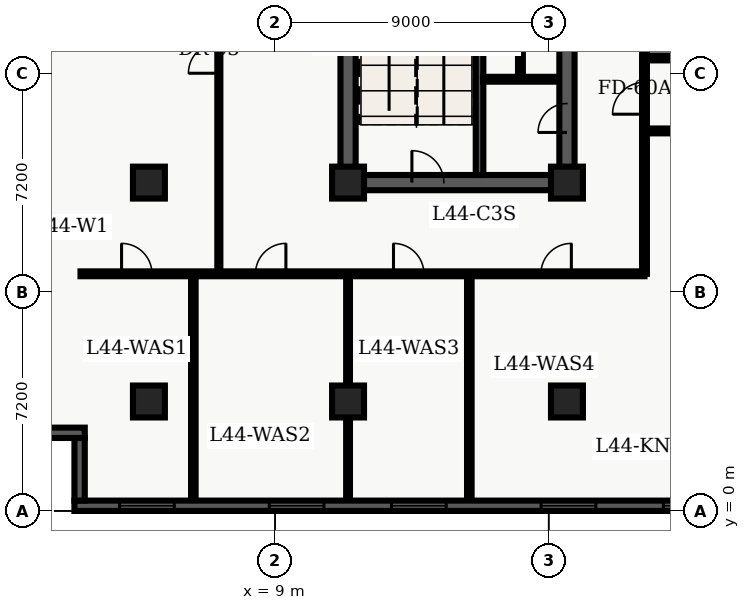
"""IFC4 building model, lengths in metres.
Left out: names, types, materials, properties, quantities, classifications, styles, units other than length and angle.
Written with IfcOpenShell. Run it as: python <this file> out.ifc"""

import sys

from ifc_helpers import new_model, entity, si_unit, converted_unit, direction, frame, origin_with_axes, origin_2d_with_axis, place, context, subcontext, project, spatial, polyline, rectangle, outline, extrude, element, fill, save


model = new_model("IFC4")
c1 = context("Model", 3, precision=1e-05, world=origin_with_axes(), true_north=direction((0.0, 1.0)))
c2 = subcontext(c1, "Body", "Model", "MODEL_VIEW")
j1 = project(units=[si_unit("LENGTHUNIT", "METRE"), converted_unit("PLANEANGLEUNIT", "DEGREE", entity("IfcPlaneAngleMeasure", 0.017), si_unit("PLANEANGLEUNIT", "RADIAN"), dimensions=[0, 0, 0, 0, 0, 0, 0])], contexts=[c1])
p1 = place(None, origin_with_axes())
s1 = spatial("IfcSite", under=j1, at=p1, CompositionType="ELEMENT")
p2 = place(p1, origin_with_axes())
s2 = spatial("IfcBuilding", under=s1, at=p2, CompositionType="ELEMENT")
p3 = place(p2, frame((0.0, 0.0, 179.7), z_axis=(0.0, 0.0, 1.0), x_axis=(1.0, 0.0, 0.0)))
s3 = spatial("IfcBuildingStorey", under=s2, at=p3, CompositionType="ELEMENT", Elevation=179.7)
p4 = place(p3, frame((11.4, 10.8, 0.0), z_axis=(0.0, 0.0, 1.0), x_axis=(0.0, 1.0, 0.0)))
e1 = element("IfcWall", 1, at=p4, inside=s3, PredefinedType="SHEAR", context=c2, shape_type="SweptSolid", body=[
    extrude(outline(polyline([(0.0, -0.25), (27.0, -0.25), (27.0, 0.25), (0.0, 0.25), (0.0, -0.25)])), origin_with_axes(), (0.0, 0.0, 1.0), 3.66),
])
p5 = place(p3, frame((11.4, 10.8, 0.0), z_axis=(0.0, 0.0, 1.0), x_axis=(1.0, 0.0, 0.0)))
e2 = element("IfcWall", 2, at=p5, inside=s3, PredefinedType="SHEAR", context=c2, shape_type="SweptSolid", body=[
    extrude(outline(polyline([(0.0, -0.25), (7.2, -0.25), (7.2, 0.25), (0.0, 0.25), (0.0, -0.25)])), origin_with_axes(), (0.0, 0.0, 1.0), 3.66),
])
p6 = place(p5, frame((2.625, 0.0, 0.0), z_axis=(0.0, 0.0, 1.0), x_axis=(1.0, 0.0, 0.0)))
e3 = element("IfcOpeningElement", 3, at=p6, cuts=e2, PredefinedType="OPENING", context=c2, shape_type="SweptSolid", body=[
    extrude(rectangle(XDim=1.05, YDim=0.52, at=origin_2d_with_axis()), origin_with_axes(), (0.0, 0.0, 1.0), 2.15),
])
p7 = place(p3, frame((18.6, 10.8, 0.0), z_axis=(0.0, 0.0, 1.0), x_axis=(0.0, 1.0, 0.0)))
e4 = element("IfcWall", 4, at=p7, inside=s3, PredefinedType="SHEAR", context=c2, shape_type="SweptSolid", body=[
    extrude(outline(polyline([(0.0, -0.25), (13.5, -0.25), (13.5, 0.25), (0.0, 0.25), (0.0, -0.25)])), origin_with_axes(), (0.0, 0.0, 1.0), 3.66),
])
p8 = place(p7, frame((11.125, 0.0, 0.0), z_axis=(0.0, 0.0, 1.0), x_axis=(1.0, 0.0, 0.0)))
e5 = element("IfcOpeningElement", 5, at=p8, cuts=e4, PredefinedType="OPENING", context=c2, shape_type="SweptSolid", body=[
    extrude(rectangle(XDim=1.05, YDim=0.52, at=origin_2d_with_axis()), origin_with_axes(), (0.0, 0.0, 1.0), 2.15),
])
p9 = place(p7, frame((2.125, 0.0, 0.0), z_axis=(0.0, 0.0, 1.0), x_axis=(1.0, 0.0, 0.0)))
e6 = element("IfcOpeningElement", 6, at=p9, cuts=e4, PredefinedType="OPENING", context=c2, shape_type="SweptSolid", body=[
    extrude(rectangle(XDim=0.95, YDim=0.52, at=origin_2d_with_axis()), origin_with_axes(), (0.0, 0.0, 1.0), 2.15),
])
p10 = place(p7, frame((6.275, 0.0, 0.0), z_axis=(0.0, 0.0, 1.0), x_axis=(1.0, 0.0, 0.0)))
e7 = element("IfcOpeningElement", 7, at=p10, cuts=e4, PredefinedType="OPENING", context=c2, shape_type="SweptSolid", body=[
    extrude(rectangle(XDim=0.95, YDim=0.52, at=origin_2d_with_axis()), origin_with_axes(), (0.0, 0.0, 1.0), 2.15),
])
p11 = place(p3, frame((15.725, 11.05, 0.0), z_axis=(0.0, 0.0, 1.0), x_axis=(0.0, 1.0, 0.0)))
e8 = element("IfcWall", 8, at=p11, inside=s3, PredefinedType="SHEAR", context=c2, shape_type="SweptSolid", body=[
    extrude(outline(polyline([(0.0, -0.125), (8.65, -0.125), (8.65, 0.125), (0.0, 0.125), (0.0, -0.125)])), origin_with_axes(), (0.0, 0.0, 1.0), 3.66),
])
for number, where, z_axis, x_axis in (
    (9, (11.4, 3.6, 0.0), (0.0, 0.0, 1.0), (1.0, 0.0, 0.0)),
    (10, (11.4, 10.8, 0.0), (0.0, 0.0, 1.0), (1.0, 0.0, 0.0)),
    (11, (18.6, 3.6, 0.0), (0.0, 0.0, 1.0), (1.0, 0.0, 0.0)),
    (12, (18.6, 10.8, 0.0), (0.0, 0.0, 1.0), (1.0, 0.0, 0.0)),
    (13, (4.85, 3.6, 0.0), (0.0, 0.0, 1.0), (1.0, 0.0, 0.0)),
    (14, (4.85, 10.8, 0.0), (0.0, 0.0, 1.0), (1.0, 0.0, 0.0)),
):
    element("IfcColumn", number, at=place(p3, frame(where, z_axis=z_axis, x_axis=x_axis)), inside=s3, PredefinedType="COLUMN", context=c2, shape_type="SweptSolid", body=[
        extrude(rectangle(XDim=1.05, YDim=1.05, at=origin_2d_with_axis()), origin_with_axes(), (0.0, 0.0, 1.0), 3.9),
    ])
p12 = place(p3, frame((15.84, 14.2, 0.0), z_axis=(0.0, 0.0, 1.0), x_axis=(1.0, 0.0, 0.0)))
e15 = element("IfcWall", 15, at=p12, inside=s3, PredefinedType="PARTITIONING", context=c2, shape_type="SweptSolid", body=[
    extrude(outline(polyline([(0.0, -0.08), (2.46, -0.08), (2.46, 0.08), (0.0, 0.08), (0.0, -0.08)])), origin_with_axes(), (0.0, 0.0, 1.0), 2.7),
])
p13 = place(p3, frame((17.07, 14.28, 0.0), z_axis=(0.0, 0.0, 1.0), x_axis=(0.0, 1.0, 0.0)))
e16 = element("IfcWall", 16, at=p13, inside=s3, PredefinedType="PARTITIONING", context=c2, shape_type="SweptSolid", body=[
    extrude(outline(polyline([(0.0, -0.08), (5.42, -0.08), (5.42, 0.08), (0.0, 0.08), (0.0, -0.08)])), origin_with_axes(), (0.0, 0.0, 1.0), 2.7),
])
p14 = place(p13, frame((2.6, 0.0, 0.0), z_axis=(0.0, 0.0, 1.0), x_axis=(1.0, 0.0, 0.0)))
e17 = element("IfcOpeningElement", 17, at=p14, cuts=e16, PredefinedType="OPENING", context=c2, shape_type="SweptSolid", body=[
    extrude(rectangle(XDim=0.9, YDim=0.18, at=origin_2d_with_axis()), origin_with_axes(), (0.0, 0.0, 1.0), 2.15),
])
p15 = place(p3, frame((2.6, 7.8, 0.0), z_axis=(0.0, 0.0, 1.0), x_axis=(1.0, 0.0, 0.0)))
e18 = element("IfcWall", 18, at=p15, inside=s3, PredefinedType="PARTITIONING", context=c2, shape_type="SweptSolid", body=[
    extrude(outline(polyline([(0.0, -0.08), (18.55, -0.08), (18.55, 0.08), (0.0, 0.08), (0.0, -0.08)])), origin_with_axes(), (0.0, 0.0, 1.0), 2.7),
])
p16 = place(p15, frame((1.851, 0.0, 0.0), z_axis=(0.0, 0.0, 1.0), x_axis=(1.0, 0.0, 0.0)))
e19 = element("IfcOpeningElement", 19, at=p16, cuts=e18, PredefinedType="OPENING", context=c2, shape_type="SweptSolid", body=[
    extrude(rectangle(XDim=1.0, YDim=0.18, at=origin_2d_with_axis()), origin_with_axes(), (0.0, 0.0, 1.0), 2.15),
])
p17 = place(p15, frame((6.255, 0.0, 0.0), z_axis=(0.0, 0.0, 1.0), x_axis=(1.0, 0.0, 0.0)))
e20 = element("IfcOpeningElement", 20, at=p17, cuts=e18, PredefinedType="OPENING", context=c2, shape_type="SweptSolid", body=[
    extrude(rectangle(XDim=1.0, YDim=0.18, at=origin_2d_with_axis()), origin_with_axes(), (0.0, 0.0, 1.0), 2.15),
])
p18 = place(p15, frame((10.794, 0.0, 0.0), z_axis=(0.0, 0.0, 1.0), x_axis=(1.0, 0.0, 0.0)))
e21 = element("IfcOpeningElement", 21, at=p18, cuts=e18, PredefinedType="OPENING", context=c2, shape_type="SweptSolid", body=[
    extrude(rectangle(XDim=1.0, YDim=0.18, at=origin_2d_with_axis()), origin_with_axes(), (0.0, 0.0, 1.0), 2.15),
])
p19 = place(p15, frame((15.645, 0.0, 0.0), z_axis=(0.0, 0.0, 1.0), x_axis=(1.0, 0.0, 0.0)))
e22 = element("IfcOpeningElement", 22, at=p19, cuts=e18, PredefinedType="OPENING", context=c2, shape_type="SweptSolid", body=[
    extrude(rectangle(XDim=1.0, YDim=0.18, at=origin_2d_with_axis()), origin_with_axes(), (0.0, 0.0, 1.0), 2.15),
])
p20 = place(p3, frame((21.15, 7.8, 0.0), z_axis=(0.0, 0.0, 1.0), x_axis=(0.0, 1.0, 0.0)))
e23 = element("IfcWall", 23, at=p20, inside=s3, PredefinedType="PARTITIONING", context=c2, shape_type="SweptSolid", body=[
    extrude(outline(polyline([(0.0, -0.08), (32.7, -0.08), (32.7, 0.08), (0.0, 0.08), (0.0, -0.08)])), origin_with_axes(), (0.0, 0.0, 1.0), 2.7),
])
p21 = place(p20, frame((16.495, 0.0, 0.0), z_axis=(0.0, 0.0, 1.0), x_axis=(1.0, 0.0, 0.0)))
e24 = element("IfcOpeningElement", 24, at=p21, cuts=e23, PredefinedType="OPENING", context=c2, shape_type="SweptSolid", body=[
    extrude(rectangle(XDim=1.0, YDim=0.18, at=origin_2d_with_axis()), origin_with_axes(), (0.0, 0.0, 1.0), 2.15),
])
p22 = place(p20, frame((22.148, 0.0, 0.0), z_axis=(0.0, 0.0, 1.0), x_axis=(1.0, 0.0, 0.0)))
e25 = element("IfcOpeningElement", 25, at=p22, cuts=e23, PredefinedType="OPENING", context=c2, shape_type="SweptSolid", body=[
    extrude(rectangle(XDim=1.0, YDim=0.18, at=origin_2d_with_axis()), origin_with_axes(), (0.0, 0.0, 1.0), 2.15),
])
p23 = place(p20, frame((28.902, 0.0, 0.0), z_axis=(0.0, 0.0, 1.0), x_axis=(1.0, 0.0, 0.0)))
e26 = element("IfcOpeningElement", 26, at=p23, cuts=e23, PredefinedType="OPENING", context=c2, shape_type="SweptSolid", body=[
    extrude(rectangle(XDim=1.0, YDim=0.18, at=origin_2d_with_axis()), origin_with_axes(), (0.0, 0.0, 1.0), 2.15),
])
p24 = place(p20, frame((5.775, 0.0, 0.0), z_axis=(0.0, 0.0, 1.0), x_axis=(1.0, 0.0, 0.0)))
e27 = element("IfcOpeningElement", 27, at=p24, cuts=e23, PredefinedType="OPENING", context=c2, shape_type="SweptSolid", body=[
    extrude(rectangle(XDim=1.05, YDim=0.18, at=origin_2d_with_axis()), origin_with_axes(), (0.0, 0.0, 1.0), 2.15),
])
p25 = place(p3, frame((7.15, 7.8, 0.0), z_axis=(0.0, 0.0, 1.0), x_axis=(0.0, 1.0, 0.0)))
e28 = element("IfcWall", 28, at=p25, inside=s3, PredefinedType="PARTITIONING", context=c2, shape_type="SweptSolid", body=[
    extrude(outline(polyline([(0.0, -0.05), (32.7, -0.05), (32.7, 0.05), (0.0, 0.05), (0.0, -0.05)])), origin_with_axes(), (0.0, 0.0, 1.0), 2.7),
])
p26 = place(p25, frame((7.098, 0.0, 0.0), z_axis=(0.0, 0.0, 1.0), x_axis=(1.0, 0.0, 0.0)))
e29 = element("IfcOpeningElement", 29, at=p26, cuts=e28, PredefinedType="OPENING", context=c2, shape_type="SweptSolid", body=[
    extrude(rectangle(XDim=1.0, YDim=0.12, at=origin_2d_with_axis()), origin_with_axes(), (0.0, 0.0, 1.0), 2.15),
])
p27 = place(p25, frame((23.317, 0.0, 0.0), z_axis=(0.0, 0.0, 1.0), x_axis=(1.0, 0.0, 0.0)))
e30 = element("IfcOpeningElement", 30, at=p27, cuts=e28, PredefinedType="OPENING", context=c2, shape_type="SweptSolid", body=[
    extrude(rectangle(XDim=1.0, YDim=0.12, at=origin_2d_with_axis()), origin_with_axes(), (0.0, 0.0, 1.0), 2.15),
])
p28 = place(p3, frame((6.311, 0.335, 0.0), z_axis=(0.0, 0.0, 1.0), x_axis=(0.0, 1.0, 0.0)))
e31 = element("IfcWall", 31, at=p28, inside=s3, PredefinedType="PARTITIONING", context=c2, shape_type="SweptSolid", body=[
    extrude(outline(polyline([(0.0, -0.075), (7.365, -0.075), (7.365, 0.075), (0.0, 0.075), (0.0, -0.075)])), origin_with_axes(), (0.0, 0.0, 1.0), 2.7),
])
p29 = place(p3, frame((11.4, 0.335, 0.0), z_axis=(0.0, 0.0, 1.0), x_axis=(0.0, 1.0, 0.0)))
e32 = element("IfcWall", 32, at=p29, inside=s3, PredefinedType="PARTITIONING", context=c2, shape_type="SweptSolid", body=[
    extrude(outline(polyline([(0.0, -0.062), (7.365, -0.062), (7.365, 0.062), (0.0, 0.062), (0.0, -0.062)])), origin_with_axes(), (0.0, 0.0, 1.0), 2.7),
])
p30 = place(p3, frame((15.389, 0.335, 0.0), z_axis=(0.0, 0.0, 1.0), x_axis=(0.0, 1.0, 0.0)))
e33 = element("IfcWall", 33, at=p30, inside=s3, PredefinedType="PARTITIONING", context=c2, shape_type="SweptSolid", body=[
    extrude(outline(polyline([(0.0, -0.075), (7.365, -0.075), (7.365, 0.075), (0.0, 0.075), (0.0, -0.075)])), origin_with_axes(), (0.0, 0.0, 1.0), 2.7),
])
p31 = place(p3, frame((21.15, 12.5, 0.0), z_axis=(0.0, 0.0, 1.0), x_axis=(1.0, 0.0, 0.0)))
e34 = element("IfcWall", 34, at=p31, inside=s3, PredefinedType="PARTITIONING", context=c2, shape_type="SweptSolid", body=[
    extrude(outline(polyline([(0.0, -0.08), (15.2, -0.08), (15.2, 0.08), (0.0, 0.08), (0.0, -0.08)])), origin_with_axes(), (0.0, 0.0, 1.0), 2.7),
])
p32 = place(p31, frame((1.761, 0.0, 0.0), z_axis=(0.0, 0.0, 1.0), x_axis=(1.0, 0.0, 0.0)))
e35 = element("IfcOpeningElement", 35, at=p32, cuts=e34, PredefinedType="OPENING", context=c2, shape_type="SweptSolid", body=[
    extrude(rectangle(XDim=1.0, YDim=0.18, at=origin_2d_with_axis()), origin_with_axes(), (0.0, 0.0, 1.0), 2.15),
])
p33 = place(p31, frame((4.896, 0.0, 0.0), z_axis=(0.0, 0.0, 1.0), x_axis=(1.0, 0.0, 0.0)))
e36 = element("IfcOpeningElement", 36, at=p33, cuts=e34, PredefinedType="OPENING", context=c2, shape_type="SweptSolid", body=[
    extrude(rectangle(XDim=1.0, YDim=0.18, at=origin_2d_with_axis()), origin_with_axes(), (0.0, 0.0, 1.0), 2.15),
])
p34 = place(p31, frame((8.536, 0.0, 0.0), z_axis=(0.0, 0.0, 1.0), x_axis=(1.0, 0.0, 0.0)))
e37 = element("IfcOpeningElement", 37, at=p34, cuts=e34, PredefinedType="OPENING", context=c2, shape_type="SweptSolid", body=[
    extrude(rectangle(XDim=1.0, YDim=0.18, at=origin_2d_with_axis()), origin_with_axes(), (0.0, 0.0, 1.0), 2.15),
])
p35 = place(p31, frame((12.871, 0.0, 0.0), z_axis=(0.0, 0.0, 1.0), x_axis=(1.0, 0.0, 0.0)))
e38 = element("IfcOpeningElement", 38, at=p35, cuts=e34, PredefinedType="OPENING", context=c2, shape_type="SweptSolid", body=[
    extrude(rectangle(XDim=1.0, YDim=0.18, at=origin_2d_with_axis()), origin_with_axes(), (0.0, 0.0, 1.0), 2.15),
])
p36 = place(p3, frame((21.15, 14.9, 0.0), z_axis=(0.0, 0.0, 1.0), x_axis=(1.0, 0.0, 0.0)))
e39 = element("IfcWall", 39, at=p36, inside=s3, PredefinedType="PARTITIONING", context=c2, shape_type="SweptSolid", body=[
    extrude(outline(polyline([(0.0, -0.08), (15.2, -0.08), (15.2, 0.08), (0.0, 0.08), (0.0, -0.08)])), origin_with_axes(), (0.0, 0.0, 1.0), 2.7),
])
p37 = place(p36, frame((7.65, 0.0, 0.0), z_axis=(0.0, 0.0, 1.0), x_axis=(1.0, 0.0, 0.0)))
e40 = element("IfcOpeningElement", 40, at=p37, cuts=e39, PredefinedType="OPENING", context=c2, shape_type="SweptSolid", body=[
    extrude(rectangle(XDim=1.0, YDim=0.18, at=origin_2d_with_axis()), origin_with_axes(), (0.0, 0.0, 1.0), 2.15),
])
p38 = place(p3, frame((57.26, 0.17, 0.0), z_axis=(0.0, 0.0, 1.0), x_axis=(-1.0, 0.0, 0.0)))
e41 = element("IfcWall", 41, at=p38, inside=s3, PredefinedType="SOLIDWALL", context=c2, shape_type="SweptSolid", body=[
    extrude(outline(polyline([(0.0, -0.17), (54.86, -0.17), (54.86, 0.17), (0.0, 0.17), (0.0, -0.17)])), origin_with_axes(), (0.0, 0.0, 1.0), 3.66),
])
p39 = place(p38, frame((2.836, 0.0, 0.45), z_axis=(0.0, 0.0, 1.0), x_axis=(1.0, 0.0, 0.0)))
e42 = element("IfcOpeningElement", 42, at=p39, cuts=e41, PredefinedType="OPENING", context=c2, shape_type="SweptSolid", body=[
    extrude(rectangle(XDim=1.8, YDim=0.36, at=origin_2d_with_axis()), origin_with_axes(), (0.0, 0.0, 1.0), 2.1),
])
p40 = place(p38, frame((7.307, 0.0, 0.45), z_axis=(0.0, 0.0, 1.0), x_axis=(1.0, 0.0, 0.0)))
e43 = element("IfcOpeningElement", 43, at=p40, cuts=e41, PredefinedType="OPENING", context=c2, shape_type="SweptSolid", body=[
    extrude(rectangle(XDim=1.8, YDim=0.36, at=origin_2d_with_axis()), origin_with_axes(), (0.0, 0.0, 1.0), 2.1),
])
p41 = place(p38, frame((11.779, 0.0, 0.45), z_axis=(0.0, 0.0, 1.0), x_axis=(1.0, 0.0, 0.0)))
e44 = element("IfcOpeningElement", 44, at=p41, cuts=e41, PredefinedType="OPENING", context=c2, shape_type="SweptSolid", body=[
    extrude(rectangle(XDim=1.8, YDim=0.36, at=origin_2d_with_axis()), origin_with_axes(), (0.0, 0.0, 1.0), 2.1),
])
p42 = place(p38, frame((16.251, 0.0, 0.45), z_axis=(0.0, 0.0, 1.0), x_axis=(1.0, 0.0, 0.0)))
e45 = element("IfcOpeningElement", 45, at=p42, cuts=e41, PredefinedType="OPENING", context=c2, shape_type="SweptSolid", body=[
    extrude(rectangle(XDim=1.8, YDim=0.36, at=origin_2d_with_axis()), origin_with_axes(), (0.0, 0.0, 1.0), 2.1),
])
p43 = place(p38, frame((20.723, 0.0, 0.45), z_axis=(0.0, 0.0, 1.0), x_axis=(1.0, 0.0, 0.0)))
e46 = element("IfcOpeningElement", 46, at=p43, cuts=e41, PredefinedType="OPENING", context=c2, shape_type="SweptSolid", body=[
    extrude(rectangle(XDim=1.8, YDim=0.36, at=origin_2d_with_axis()), origin_with_axes(), (0.0, 0.0, 1.0), 2.1),
])
p44 = place(p38, frame((34.588, 0.0, 0.45), z_axis=(0.0, 0.0, 1.0), x_axis=(1.0, 0.0, 0.0)))
e47 = element("IfcOpeningElement", 47, at=p44, cuts=e41, PredefinedType="OPENING", context=c2, shape_type="SweptSolid", body=[
    extrude(rectangle(XDim=1.8, YDim=0.36, at=origin_2d_with_axis()), origin_with_axes(), (0.0, 0.0, 1.0), 2.1),
])
p45 = place(p38, frame((38.609, 0.0, 0.45), z_axis=(0.0, 0.0, 1.0), x_axis=(1.0, 0.0, 0.0)))
e48 = element("IfcOpeningElement", 48, at=p45, cuts=e41, PredefinedType="OPENING", context=c2, shape_type="SweptSolid", body=[
    extrude(rectangle(XDim=1.8, YDim=0.36, at=origin_2d_with_axis()), origin_with_axes(), (0.0, 0.0, 1.0), 2.1),
])
p46 = place(p38, frame((43.531, 0.0, 0.45), z_axis=(0.0, 0.0, 1.0), x_axis=(1.0, 0.0, 0.0)))
e49 = element("IfcOpeningElement", 49, at=p46, cuts=e41, PredefinedType="OPENING", context=c2, shape_type="SweptSolid", body=[
    extrude(rectangle(XDim=1.8, YDim=0.36, at=origin_2d_with_axis()), origin_with_axes(), (0.0, 0.0, 1.0), 2.1),
])
p47 = place(p38, frame((47.553, 0.0, 0.45), z_axis=(0.0, 0.0, 1.0), x_axis=(1.0, 0.0, 0.0)))
e50 = element("IfcOpeningElement", 50, at=p47, cuts=e41, PredefinedType="OPENING", context=c2, shape_type="SweptSolid", body=[
    extrude(rectangle(XDim=1.8, YDim=0.36, at=origin_2d_with_axis()), origin_with_axes(), (0.0, 0.0, 1.0), 2.1),
])
p48 = place(p38, frame((52.474, 0.0, 0.45), z_axis=(0.0, 0.0, 1.0), x_axis=(1.0, 0.0, 0.0)))
e51 = element("IfcOpeningElement", 51, at=p48, cuts=e41, PredefinedType="OPENING", context=c2, shape_type="SweptSolid", body=[
    extrude(rectangle(XDim=1.8, YDim=0.36, at=origin_2d_with_axis()), origin_with_axes(), (0.0, 0.0, 1.0), 2.1),
])
p49 = place(p3, frame((2.57, 0.34, 0.0), z_axis=(0.0, 0.0, 1.0), x_axis=(0.0, 1.0, 0.0)))
e52 = element("IfcWall", 52, at=p49, inside=s3, PredefinedType="SOLIDWALL", context=c2, shape_type="SweptSolid", body=[
    extrude(outline(polyline([(0.0, -0.17), (2.06, -0.17), (2.06, 0.17), (0.0, 0.17), (0.0, -0.17)])), origin_with_axes(), (0.0, 0.0, 1.0), 3.66),
])
p50 = place(p3, frame((2.74, 2.57, 0.0), z_axis=(0.0, 0.0, 1.0), x_axis=(-1.0, 0.0, 0.0)))
e53 = element("IfcWall", 53, at=p50, inside=s3, PredefinedType="SOLIDWALL", context=c2, shape_type="SweptSolid", body=[
    extrude(outline(polyline([(0.0, -0.17), (2.74, -0.17), (2.74, 0.17), (0.0, 0.17), (0.0, -0.17)])), origin_with_axes(), (0.0, 0.0, 1.0), 3.66),
])
p51 = place(p5, frame((2.625, 0.0, 0.0), z_axis=(0.0, 0.0, 1.0), x_axis=(1.0, 0.0, 0.0)))
e54 = element("IfcDoor", 54, at=p51, inside=s3, OperationType="SINGLE_SWING_LEFT", PredefinedType="DOOR", context=c2, shape_type="SweptSolid", body=[
    extrude(rectangle(XDim=1.05, YDim=0.09, at=origin_2d_with_axis()), origin_with_axes(), (0.0, 0.0, 1.0), 2.15),
])
fill(e3, e54)
p52 = place(p7, frame((2.125, 0.0, 0.0), z_axis=(0.0, 0.0, 1.0), x_axis=(1.0, 0.0, 0.0)))
e55 = element("IfcDoor", 55, at=p52, inside=s3, OperationType="SINGLE_SWING_LEFT", PredefinedType="DOOR", context=c2, shape_type="SweptSolid", body=[
    extrude(rectangle(XDim=0.95, YDim=0.09, at=origin_2d_with_axis()), origin_with_axes(), (0.0, 0.0, 1.0), 2.15),
])
fill(e6, e55)
p53 = place(p25, frame((7.098, 0.0, 0.0), z_axis=(0.0, 0.0, 1.0), x_axis=(1.0, 0.0, 0.0)))
e56 = element("IfcDoor", 56, at=p53, inside=s3, OperationType="SINGLE_SWING_LEFT", PredefinedType="DOOR", context=c2, shape_type="SweptSolid", body=[
    extrude(rectangle(XDim=1.0, YDim=0.06, at=origin_2d_with_axis()), origin_with_axes(), (0.0, 0.0, 1.0), 2.15),
])
fill(e29, e56)
p54 = place(p15, frame((1.851, 0.0, 0.0), z_axis=(0.0, 0.0, 1.0), x_axis=(1.0, 0.0, 0.0)))
e57 = element("IfcDoor", 57, at=p54, inside=s3, OperationType="SINGLE_SWING_LEFT", PredefinedType="DOOR", context=c2, shape_type="SweptSolid", body=[
    extrude(rectangle(XDim=1.0, YDim=0.09, at=origin_2d_with_axis()), origin_with_axes(), (0.0, 0.0, 1.0), 2.15),
])
fill(e19, e57)
p55 = place(p15, frame((6.255, 0.0, 0.0), z_axis=(0.0, 0.0, 1.0), x_axis=(1.0, 0.0, 0.0)))
e58 = element("IfcDoor", 58, at=p55, inside=s3, OperationType="SINGLE_SWING_RIGHT", PredefinedType="DOOR", context=c2, shape_type="SweptSolid", body=[
    extrude(rectangle(XDim=1.0, YDim=0.09, at=origin_2d_with_axis()), origin_with_axes(), (0.0, 0.0, 1.0), 2.15),
])
fill(e20, e58)
p56 = place(p15, frame((10.794, 0.0, 0.0), z_axis=(0.0, 0.0, 1.0), x_axis=(1.0, 0.0, 0.0)))
e59 = element("IfcDoor", 59, at=p56, inside=s3, OperationType="SINGLE_SWING_LEFT", PredefinedType="DOOR", context=c2, shape_type="SweptSolid", body=[
    extrude(rectangle(XDim=1.0, YDim=0.09, at=origin_2d_with_axis()), origin_with_axes(), (0.0, 0.0, 1.0), 2.15),
])
fill(e21, e59)
p57 = place(p15, frame((15.645, 0.0, 0.0), z_axis=(0.0, 0.0, 1.0), x_axis=(1.0, 0.0, 0.0)))
e60 = element("IfcDoor", 60, at=p57, inside=s3, OperationType="SINGLE_SWING_RIGHT", PredefinedType="DOOR", context=c2, shape_type="SweptSolid", body=[
    extrude(rectangle(XDim=1.0, YDim=0.09, at=origin_2d_with_axis()), origin_with_axes(), (0.0, 0.0, 1.0), 2.15),
])
fill(e22, e60)
p58 = place(p20, frame((5.775, 0.0, 0.0), z_axis=(0.0, 0.0, 1.0), x_axis=(1.0, 0.0, 0.0)))
e61 = element("IfcDoor", 61, at=p58, inside=s3, OperationType="SINGLE_SWING_LEFT", PredefinedType="DOOR", context=c2, shape_type="SweptSolid", body=[
    extrude(rectangle(XDim=1.05, YDim=0.09, at=origin_2d_with_axis()), origin_with_axes(), (0.0, 0.0, 1.0), 2.15),
])
fill(e27, e61)
p59 = place(p38, frame((34.588, 0.0, 0.45), z_axis=(0.0, 0.0, 1.0), x_axis=(1.0, 0.0, 0.0)))
e62 = element("IfcWindow", 62, at=p59, inside=s3, PredefinedType="WINDOW", context=c2, shape_type="SweptSolid", body=[
    extrude(rectangle(XDim=1.8, YDim=0.09, at=origin_2d_with_axis()), origin_with_axes(), (0.0, 0.0, 1.0), 2.1),
])
fill(e47, e62)
p60 = place(p38, frame((38.609, 0.0, 0.45), z_axis=(0.0, 0.0, 1.0), x_axis=(1.0, 0.0, 0.0)))
e63 = element("IfcWindow", 63, at=p60, inside=s3, PredefinedType="WINDOW", context=c2, shape_type="SweptSolid", body=[
    extrude(rectangle(XDim=1.8, YDim=0.09, at=origin_2d_with_axis()), origin_with_axes(), (0.0, 0.0, 1.0), 2.1),
])
fill(e48, e63)
p61 = place(p38, frame((43.531, 0.0, 0.45), z_axis=(0.0, 0.0, 1.0), x_axis=(1.0, 0.0, 0.0)))
e64 = element("IfcWindow", 64, at=p61, inside=s3, PredefinedType="WINDOW", context=c2, shape_type="SweptSolid", body=[
    extrude(rectangle(XDim=1.8, YDim=0.09, at=origin_2d_with_axis()), origin_with_axes(), (0.0, 0.0, 1.0), 2.1),
])
fill(e49, e64)
p62 = place(p38, frame((47.553, 0.0, 0.45), z_axis=(0.0, 0.0, 1.0), x_axis=(1.0, 0.0, 0.0)))
e65 = element("IfcWindow", 65, at=p62, inside=s3, PredefinedType="WINDOW", context=c2, shape_type="SweptSolid", body=[
    extrude(rectangle(XDim=1.8, YDim=0.09, at=origin_2d_with_axis()), origin_with_axes(), (0.0, 0.0, 1.0), 2.1),
])
fill(e50, e65)
p63 = place(p38, frame((52.474, 0.0, 0.45), z_axis=(0.0, 0.0, 1.0), x_axis=(1.0, 0.0, 0.0)))
e66 = element("IfcWindow", 66, at=p63, inside=s3, PredefinedType="WINDOW", context=c2, shape_type="SweptSolid", body=[
    extrude(rectangle(XDim=1.8, YDim=0.09, at=origin_2d_with_axis()), origin_with_axes(), (0.0, 0.0, 1.0), 2.1),
])
fill(e51, e66)
save(model, sys.argv[1])
